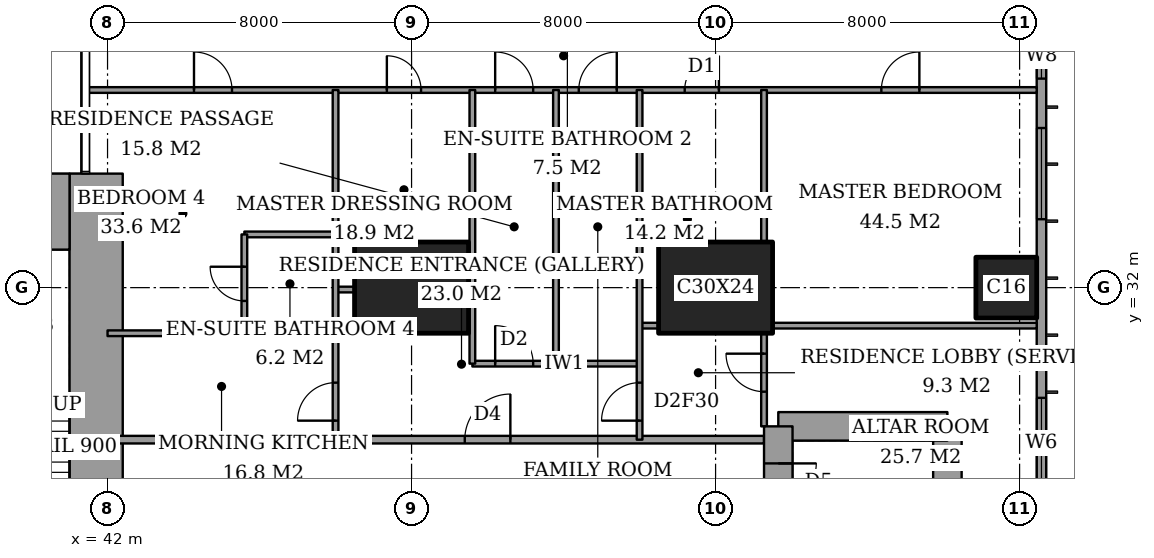
"""IFC4 building model, lengths in metres.
Left out: names, types, materials, properties, quantities, classifications, styles, units other than length and angle.
Written with IfcOpenShell. Run it as: python <this file> out.ifc"""

import sys

from ifc_helpers import new_model, si_unit, direction, frame, frame_2d, origin, origin_2d, place, context, subcontext, project, spatial, rectangle, extrude, element, fill, save


model = new_model("IFC4")
c1 = context("Model", 3, precision=1e-05, world=origin(), true_north=direction((0.0, 1.0)))
c2 = subcontext(c1, "Body", "Model", "MODEL_VIEW")
j1 = project(units=[si_unit("LENGTHUNIT", "METRE"), si_unit("PLANEANGLEUNIT", "RADIAN")], contexts=[c1])
p1 = place(None, origin())
s1 = spatial("IfcSite", under=j1, at=p1, CompositionType="ELEMENT")
p2 = place(p1, origin())
s2 = spatial("IfcBuilding", under=s1, at=p2, CompositionType="ELEMENT")
p3 = place(p2, frame((0.0, 0.0, 266.4)))
s3 = spatial("IfcBuildingStorey", under=s2, at=p3, CompositionType="ELEMENT", Elevation=266.4)
for number, where, z_axis, x_axis in (
    (1, (50.0, 32.0, 0.0), (0.0, 0.0, 1.0), (1.0, 0.0, 0.0)),
    (2, (58.0, 32.0, 0.0), (0.0, 0.0, 1.0), (1.0, 0.0, 0.0)),
):
    element("IfcColumn", number, at=place(p3, frame(where, z_axis=z_axis, x_axis=x_axis)), inside=s3, PredefinedType="COLUMN", context=c2, shape_type="SweptSolid", body=[
        extrude(rectangle(XDim=3.0, YDim=2.4, at=origin_2d()), origin(), (0.0, 0.0, 1.0), 3.6),
    ])
p4 = place(p3, frame((65.65, 32.0, 0.0), z_axis=(0.0, 0.0, 1.0), x_axis=(1.0, 0.0, 0.0)))
e3 = element("IfcColumn", 3, at=p4, inside=s3, PredefinedType="COLUMN", context=c2, shape_type="SweptSolid", body=[
    extrude(rectangle(XDim=1.6, YDim=1.6, at=origin_2d()), origin(), (0.0, 0.0, 1.0), 3.6),
])
p5 = place(p3, frame((37.85, 34.0, 0.0), z_axis=(0.0, 0.0, 1.0), x_axis=(1.0, 0.0, 0.0)))
e4 = element("IfcWall", 4, at=p5, inside=s3, PredefinedType="SHEAR", context=c2, shape_type="SweptSolid", body=[
    extrude(rectangle(XDim=3.15, YDim=2.0, at=frame_2d((1.575, 0.0))), origin(), (0.0, 0.0, 1.0), 3.6),
])
p6 = place(p3, frame((41.7, 24.85, 0.0), z_axis=(0.0, 0.0, 1.0), x_axis=(0.0, 1.0, 0.0)))
e5 = element("IfcWall", 5, at=p6, inside=s3, PredefinedType="SHEAR", context=c2, shape_type="SweptSolid", body=[
    extrude(rectangle(XDim=10.15, YDim=1.4, at=frame_2d((5.075, 0.0))), origin(), (0.0, 0.0, 1.0), 3.6),
])
p7 = place(p3, frame((64.1, 19.65, 0.0), z_axis=(0.0, 0.0, 1.0), x_axis=(0.0, 1.0, 0.0)))
e6 = element("IfcWall", 6, at=p7, inside=s3, PredefinedType="SHEAR", context=c2, shape_type="SweptSolid", body=[
    extrude(rectangle(XDim=8.7, YDim=0.75, at=frame_2d((4.35, 0.0))), origin(), (0.0, 0.0, 1.0), 3.6),
])
p8 = place(p3, frame((64.1, 28.35, 0.0), z_axis=(0.0, 0.0, 1.0), x_axis=(-1.0, 0.0, 0.0)))
e7 = element("IfcWall", 7, at=p8, inside=s3, PredefinedType="SHEAR", context=c2, shape_type="SweptSolid", body=[
    extrude(rectangle(XDim=4.45, YDim=0.75, at=frame_2d((2.225, 0.0))), origin(), (0.0, 0.0, 1.0), 3.6),
])
p9 = place(p3, frame((59.65, 28.35, 0.0), z_axis=(0.0, 0.0, 1.0), x_axis=(0.0, -1.0, 0.0)))
e8 = element("IfcWall", 8, at=p9, inside=s3, PredefinedType="SHEAR", context=c2, shape_type="SweptSolid", body=[
    extrude(rectangle(XDim=8.7, YDim=0.75, at=frame_2d((4.35, 0.0))), origin(), (0.0, 0.0, 1.0), 3.6),
])
p10 = place(p9, frame((0.975, 0.0, 0.0)))
e9 = element("IfcOpeningElement", 9, at=p10, cuts=e8, PredefinedType="OPENING", context=c2, shape_type="SweptSolid", body=[
    extrude(rectangle(XDim=1.0, YDim=2.1, at=frame_2d((0.5, 1.05))), frame((0.0, 0.385, 0.0), z_axis=(0.0, -1.0, 0.0), x_axis=(1.0, 0.0, 0.0)), (0.0, 0.0, 1.0), 0.77),
])
p11 = place(p3, frame((66.575, 3.175, 0.0), z_axis=(0.0, 0.0, 1.0), x_axis=(0.0, 1.0, 0.0)))
e10 = element("IfcWall", 10, at=p11, inside=s3, PredefinedType="SOLIDWALL", context=c2, shape_type="SweptSolid", body=[
    extrude(rectangle(XDim=41.65, YDim=0.25, at=frame_2d((20.825, 0.0))), origin(), (0.0, 0.0, 1.0), 3.6),
])
p12 = place(p11, frame((0.875, 0.0, 0.6)))
e11 = element("IfcOpeningElement", 11, at=p12, cuts=e10, PredefinedType="OPENING", context=c2, shape_type="SweptSolid", body=[
    extrude(rectangle(XDim=2.4, YDim=2.0, at=frame_2d((1.2, 1.0))), frame((0.0, 0.135, 0.0), z_axis=(0.0, -1.0, 0.0), x_axis=(1.0, 0.0, 0.0)), (0.0, 0.0, 1.0), 0.27),
])
p13 = place(p11, frame((6.0, 0.0, 0.6)))
e12 = element("IfcOpeningElement", 12, at=p13, cuts=e10, PredefinedType="OPENING", context=c2, shape_type="SweptSolid", body=[
    extrude(rectangle(XDim=1.2, YDim=2.0, at=frame_2d((0.6, 1.0))), frame((0.0, 0.135, 0.0), z_axis=(0.0, -1.0, 0.0), x_axis=(1.0, 0.0, 0.0)), (0.0, 0.0, 1.0), 0.27),
])
p14 = place(p11, frame((8.525, 0.0, 0.6)))
e13 = element("IfcOpeningElement", 13, at=p14, cuts=e10, PredefinedType="OPENING", context=c2, shape_type="SweptSolid", body=[
    extrude(rectangle(XDim=2.4, YDim=2.0, at=frame_2d((1.2, 1.0))), frame((0.0, 0.135, 0.0), z_axis=(0.0, -1.0, 0.0), x_axis=(1.0, 0.0, 0.0)), (0.0, 0.0, 1.0), 0.27),
])
p15 = place(p11, frame((15.625, 0.0, 0.6)))
e14 = element("IfcOpeningElement", 14, at=p15, cuts=e10, PredefinedType="OPENING", context=c2, shape_type="SweptSolid", body=[
    extrude(rectangle(XDim=2.4, YDim=2.0, at=frame_2d((1.2, 1.0))), frame((0.0, 0.135, 0.0), z_axis=(0.0, -1.0, 0.0), x_axis=(1.0, 0.0, 0.0)), (0.0, 0.0, 1.0), 0.27),
])
p16 = place(p11, frame((23.525, 0.0, 0.6)))
e15 = element("IfcOpeningElement", 15, at=p16, cuts=e10, PredefinedType="OPENING", context=c2, shape_type="SweptSolid", body=[
    extrude(rectangle(XDim=2.4, YDim=2.0, at=frame_2d((1.2, 1.0))), frame((0.0, 0.135, 0.0), z_axis=(0.0, -1.0, 0.0), x_axis=(1.0, 0.0, 0.0)), (0.0, 0.0, 1.0), 0.27),
])
p17 = place(p11, frame((30.625, 0.0, 0.6)))
e16 = element("IfcOpeningElement", 16, at=p17, cuts=e10, PredefinedType="OPENING", context=c2, shape_type="SweptSolid", body=[
    extrude(rectangle(XDim=2.4, YDim=2.0, at=frame_2d((1.2, 1.0))), frame((0.0, 0.135, 0.0), z_axis=(0.0, -1.0, 0.0), x_axis=(1.0, 0.0, 0.0)), (0.0, 0.0, 1.0), 0.27),
])
p18 = place(p11, frame((34.325, 0.0, 0.6)))
e17 = element("IfcOpeningElement", 17, at=p18, cuts=e10, PredefinedType="OPENING", context=c2, shape_type="SweptSolid", body=[
    extrude(rectangle(XDim=1.2, YDim=2.0, at=frame_2d((0.6, 1.0))), frame((0.0, 0.135, 0.0), z_axis=(0.0, -1.0, 0.0), x_axis=(1.0, 0.0, 0.0)), (0.0, 0.0, 1.0), 0.27),
])
p19 = place(p11, frame((38.375, 0.0, 0.6)))
e18 = element("IfcOpeningElement", 18, at=p19, cuts=e10, PredefinedType="OPENING", context=c2, shape_type="SweptSolid", body=[
    extrude(rectangle(XDim=2.4, YDim=2.0, at=frame_2d((1.2, 1.0))), frame((0.0, 0.135, 0.0), z_axis=(0.0, -1.0, 0.0), x_axis=(1.0, 0.0, 0.0)), (0.0, 0.0, 1.0), 0.27),
])
p20 = place(p3, frame((42.0, 28.0, 0.0), z_axis=(0.0, 0.0, 1.0), x_axis=(1.0, 0.0, 0.0)))
e19 = element("IfcWall", 19, at=p20, inside=s3, PredefinedType="PARTITIONING", context=c2, shape_type="SweptSolid", body=[
    extrude(rectangle(XDim=17.275, YDim=0.2, at=frame_2d((8.637, 0.0))), origin(), (0.0, 0.0, 1.0), 3.35),
])
p21 = place(p20, frame((9.4, 0.0, 0.0)))
e20 = element("IfcOpeningElement", 20, at=p21, cuts=e19, PredefinedType="OPENING", context=c2, shape_type="SweptSolid", body=[
    extrude(rectangle(XDim=1.2, YDim=2.4, at=frame_2d((0.6, 1.2))), frame((0.0, 0.11, 0.0), z_axis=(0.0, -1.0, 0.0), x_axis=(1.0, 0.0, 0.0)), (0.0, 0.0, 1.0), 0.22),
])
p22 = place(p3, frame((51.6, 30.0, 0.0), z_axis=(0.0, 0.0, 1.0), x_axis=(1.0, 0.0, 0.0)))
e21 = element("IfcWall", 21, at=p22, inside=s3, PredefinedType="PARTITIONING", context=c2, shape_type="SweptSolid", body=[
    extrude(rectangle(XDim=4.4, YDim=0.15, at=frame_2d((2.2, 0.0))), origin(), (0.0, 0.0, 1.0), 3.35),
])
p23 = place(p22, frame((0.6, 0.0, 0.0)))
e22 = element("IfcOpeningElement", 22, at=p23, cuts=e21, PredefinedType="OPENING", context=c2, shape_type="SweptSolid", body=[
    extrude(rectangle(XDim=1.0, YDim=2.1, at=frame_2d((0.5, 1.05))), frame((0.0, 0.085, 0.0), z_axis=(0.0, -1.0, 0.0), x_axis=(1.0, 0.0, 0.0)), (0.0, 0.0, 1.0), 0.17),
])
p24 = place(p3, frame((42.0, 30.8, 0.0), z_axis=(0.0, 0.0, 1.0), x_axis=(1.0, 0.0, 0.0)))
e23 = element("IfcWall", 23, at=p24, inside=s3, PredefinedType="PARTITIONING", context=c2, shape_type="SweptSolid", body=[
    extrude(rectangle(XDim=6.0, YDim=0.15, at=frame_2d((3.0, 0.0))), origin(), (0.0, 0.0, 1.0), 3.35),
])
p25 = place(p3, frame((56.0, 31.0, 0.0), z_axis=(0.0, 0.0, 1.0), x_axis=(1.0, 0.0, 0.0)))
e24 = element("IfcWall", 24, at=p25, inside=s3, PredefinedType="PARTITIONING", context=c2, shape_type="SweptSolid", body=[
    extrude(rectangle(XDim=0.5, YDim=0.15, at=frame_2d((0.25, 0.0))), origin(), (0.0, 0.0, 1.0), 3.35),
])
p26 = place(p3, frame((59.5, 31.0, 0.0), z_axis=(0.0, 0.0, 1.0), x_axis=(1.0, 0.0, 0.0)))
e25 = element("IfcWall", 25, at=p26, inside=s3, PredefinedType="PARTITIONING", context=c2, shape_type="SweptSolid", body=[
    extrude(rectangle(XDim=6.95, YDim=0.15, at=frame_2d((3.475, 0.0))), origin(), (0.0, 0.0, 1.0), 3.35),
])
p27 = place(p3, frame((48.0, 31.95, 0.0), z_axis=(0.0, 0.0, 1.0), x_axis=(1.0, 0.0, 0.0)))
e26 = element("IfcWall", 26, at=p27, inside=s3, PredefinedType="PARTITIONING", context=c2, shape_type="SweptSolid", body=[
    extrude(rectangle(XDim=0.5, YDim=0.15, at=frame_2d((0.25, 0.0))), origin(), (0.0, 0.0, 1.0), 2.634),
])
p28 = place(p3, frame((45.6, 33.4, 0.0), z_axis=(0.0, 0.0, 1.0), x_axis=(1.0, 0.0, 0.0)))
e27 = element("IfcWall", 27, at=p28, inside=s3, PredefinedType="PARTITIONING", context=c2, shape_type="SweptSolid", body=[
    extrude(rectangle(XDim=2.4, YDim=0.15, at=frame_2d((1.2, 0.0))), origin(), (0.0, 0.0, 1.0), 3.35),
])
p29 = place(p3, frame((41.439, 37.2, 0.0), z_axis=(0.0, 0.0, 1.0), x_axis=(1.0, 0.0, 0.0)))
e28 = element("IfcWall", 28, at=p29, inside=s3, PredefinedType="PARTITIONING", context=c2, shape_type="SweptSolid", body=[
    extrude(rectangle(XDim=25.011, YDim=0.15, at=frame_2d((12.505, 0.0))), origin(), (0.0, 0.0, 1.0), 3.35),
])
p30 = place(p29, frame((10.761, 0.0, 0.0)))
e29 = element("IfcOpeningElement", 29, at=p30, cuts=e28, PredefinedType="OPENING", context=c2, shape_type="SweptSolid", body=[
    extrude(rectangle(XDim=1.0, YDim=2.1, at=frame_2d((0.5, 1.05))), frame((0.0, 0.085, 0.0), z_axis=(0.0, -1.0, 0.0), x_axis=(1.0, 0.0, 0.0)), (0.0, 0.0, 1.0), 0.17),
])
p31 = place(p29, frame((20.924, 0.0, 0.0)))
e30 = element("IfcOpeningElement", 30, at=p31, cuts=e28, PredefinedType="OPENING", context=c2, shape_type="SweptSolid", body=[
    extrude(rectangle(XDim=1.0, YDim=2.1, at=frame_2d((0.5, 1.05))), frame((0.0, 0.085, 0.0), z_axis=(0.0, -1.0, 0.0), x_axis=(1.0, 0.0, 0.0)), (0.0, 0.0, 1.0), 0.17),
])
p32 = place(p29, frame((15.749, 0.0, 0.0)))
e31 = element("IfcOpeningElement", 31, at=p32, cuts=e28, PredefinedType="OPENING", context=c2, shape_type="SweptSolid", body=[
    extrude(rectangle(XDim=0.9, YDim=2.1, at=frame_2d((0.45, 1.05))), frame((0.0, 0.085, 0.0), z_axis=(0.0, -1.0, 0.0), x_axis=(1.0, 0.0, 0.0)), (0.0, 0.0, 1.0), 0.17),
])
p33 = place(p29, frame((12.961, 0.0, 0.0)))
e32 = element("IfcOpeningElement", 32, at=p33, cuts=e28, PredefinedType="OPENING", context=c2, shape_type="SweptSolid", body=[
    extrude(rectangle(XDim=1.0, YDim=2.1, at=frame_2d((0.5, 1.05))), frame((0.0, 0.085, 0.0), z_axis=(0.0, -1.0, 0.0), x_axis=(1.0, 0.0, 0.0)), (0.0, 0.0, 1.0), 0.17),
])
p34 = place(p29, frame((7.911, 0.0, 0.0)))
e33 = element("IfcOpeningElement", 33, at=p34, cuts=e28, PredefinedType="OPENING", context=c2, shape_type="SweptSolid", body=[
    extrude(rectangle(XDim=0.9, YDim=2.1, at=frame_2d((0.45, 1.05))), frame((0.0, 0.085, 0.0), z_axis=(0.0, -1.0, 0.0), x_axis=(1.0, 0.0, 0.0)), (0.0, 0.0, 1.0), 0.17),
])
p35 = place(p29, frame((2.836, 0.0, 0.0)))
e34 = element("IfcOpeningElement", 34, at=p35, cuts=e28, PredefinedType="OPENING", context=c2, shape_type="SweptSolid", body=[
    extrude(rectangle(XDim=1.0, YDim=2.1, at=frame_2d((0.5, 1.05))), frame((0.0, 0.085, 0.0), z_axis=(0.0, -1.0, 0.0), x_axis=(1.0, 0.0, 0.0)), (0.0, 0.0, 1.0), 0.17),
])
p36 = place(p3, frame((45.6, 30.8, 0.0), z_axis=(0.0, 0.0, 1.0), x_axis=(0.0, 1.0, 0.0)))
e35 = element("IfcWall", 35, at=p36, inside=s3, PredefinedType="PARTITIONING", context=c2, shape_type="SweptSolid", body=[
    extrude(rectangle(XDim=2.6, YDim=0.15, at=frame_2d((1.3, 0.0))), origin(), (0.0, 0.0, 1.0), 3.35),
])
p37 = place(p36, frame((0.85, 0.0, 0.0)))
e36 = element("IfcOpeningElement", 36, at=p37, cuts=e35, PredefinedType="OPENING", context=c2, shape_type="SweptSolid", body=[
    extrude(rectangle(XDim=0.9, YDim=2.1, at=frame_2d((0.45, 1.05))), frame((0.0, 0.085, 0.0), z_axis=(0.0, -1.0, 0.0), x_axis=(1.0, 0.0, 0.0)), (0.0, 0.0, 1.0), 0.17),
])
p38 = place(p3, frame((48.0, 28.0, 0.0), z_axis=(0.0, 0.0, 1.0), x_axis=(0.0, 1.0, 0.0)))
e37 = element("IfcWall", 37, at=p38, inside=s3, PredefinedType="PARTITIONING", context=c2, shape_type="SweptSolid", body=[
    extrude(rectangle(XDim=9.2, YDim=0.15, at=frame_2d((4.6, 0.0))), origin(), (0.0, 0.0, 1.0), 3.35),
])
p39 = place(p38, frame((0.5, 0.0, 0.0)))
e38 = element("IfcOpeningElement", 38, at=p39, cuts=e37, PredefinedType="OPENING", context=c2, shape_type="SweptSolid", body=[
    extrude(rectangle(XDim=1.0, YDim=2.1, at=frame_2d((0.5, 1.05))), frame((0.0, 0.085, 0.0), z_axis=(0.0, -1.0, 0.0), x_axis=(1.0, 0.0, 0.0)), (0.0, 0.0, 1.0), 0.17),
])
for number, where, z_axis, x_axis in (
    (39, (51.6, 30.0, 0.0), (0.0, 0.0, 1.0), (0.0, 1.0, 0.0)),
    (40, (53.8, 30.0, 0.0), (0.0, 0.0, 1.0), (0.0, 1.0, 0.0)),
):
    element("IfcWall", number, at=place(p3, frame(where, z_axis=z_axis, x_axis=x_axis)), inside=s3, PredefinedType="PARTITIONING", context=c2, shape_type="SweptSolid", body=[
        extrude(rectangle(XDim=7.2, YDim=0.15, at=frame_2d((3.6, 0.0))), origin(), (0.0, 0.0, 1.0), 3.35),
    ])
p40 = place(p3, frame((56.0, 28.0, 0.0), z_axis=(0.0, 0.0, 1.0), x_axis=(0.0, 1.0, 0.0)))
e41 = element("IfcWall", 41, at=p40, inside=s3, PredefinedType="PARTITIONING", context=c2, shape_type="SweptSolid", body=[
    extrude(rectangle(XDim=9.2, YDim=0.15, at=frame_2d((4.6, 0.0))), origin(), (0.0, 0.0, 1.0), 3.35),
])
p41 = place(p40, frame((0.5, 0.0, 0.0)))
e42 = element("IfcOpeningElement", 42, at=p41, cuts=e41, PredefinedType="OPENING", context=c2, shape_type="SweptSolid", body=[
    extrude(rectangle(XDim=1.0, YDim=2.1, at=frame_2d((0.5, 1.05))), frame((0.0, 0.085, 0.0), z_axis=(0.0, -1.0, 0.0), x_axis=(1.0, 0.0, 0.0)), (0.0, 0.0, 1.0), 0.17),
])
p42 = place(p3, frame((59.275, 28.35, 0.0), z_axis=(0.0, 0.0, 1.0), x_axis=(0.0, 1.0, 0.0)))
e43 = element("IfcWall", 43, at=p42, inside=s3, PredefinedType="PARTITIONING", context=c2, shape_type="SweptSolid", body=[
    extrude(rectangle(XDim=2.45, YDim=0.15, at=frame_2d((1.225, 0.0))), origin(), (0.0, 0.0, 1.0), 3.35),
])
p43 = place(p42, frame((0.913, 0.0, 0.0)))
e44 = element("IfcOpeningElement", 44, at=p43, cuts=e43, PredefinedType="OPENING", context=c2, shape_type="SweptSolid", body=[
    extrude(rectangle(XDim=1.0, YDim=2.1, at=frame_2d((0.5, 1.05))), frame((0.0, 0.085, 0.0), z_axis=(0.0, -1.0, 0.0), x_axis=(1.0, 0.0, 0.0)), (0.0, 0.0, 1.0), 0.17),
])
p44 = place(p3, frame((59.275, 33.2, 0.0), z_axis=(0.0, 0.0, 1.0), x_axis=(0.0, 1.0, 0.0)))
e45 = element("IfcWall", 45, at=p44, inside=s3, PredefinedType="PARTITIONING", context=c2, shape_type="SweptSolid", body=[
    extrude(rectangle(XDim=4.0, YDim=0.15, at=frame_2d((2.0, 0.0))), origin(), (0.0, 0.0, 1.0), 3.35),
])
p45 = place(p16, origin())
e46 = element("IfcWindow", 46, at=p45, inside=s3, PartitioningType="SINGLE_PANEL", PredefinedType="WINDOW", context=c2, shape_type="SweptSolid", body=[
    extrude(rectangle(XDim=2.4, YDim=2.0, at=frame_2d((1.2, 1.0))), frame((0.0, 0.03, 0.0), z_axis=(0.0, -1.0, 0.0), x_axis=(1.0, 0.0, 0.0)), (0.0, 0.0, 1.0), 0.06),
])
fill(e15, e46)
p46 = place(p17, origin())
e47 = element("IfcWindow", 47, at=p46, inside=s3, PartitioningType="SINGLE_PANEL", PredefinedType="WINDOW", context=c2, shape_type="SweptSolid", body=[
    extrude(rectangle(XDim=2.4, YDim=2.0, at=frame_2d((1.2, 1.0))), frame((0.0, 0.03, 0.0), z_axis=(0.0, -1.0, 0.0), x_axis=(1.0, 0.0, 0.0)), (0.0, 0.0, 1.0), 0.06),
])
fill(e16, e47)
p47 = place(p18, origin())
e48 = element("IfcWindow", 48, at=p47, inside=s3, PartitioningType="SINGLE_PANEL", PredefinedType="WINDOW", context=c2, shape_type="SweptSolid", body=[
    extrude(rectangle(XDim=1.2, YDim=2.0, at=frame_2d((0.6, 1.0))), frame((0.0, 0.03, 0.0), z_axis=(0.0, -1.0, 0.0), x_axis=(1.0, 0.0, 0.0)), (0.0, 0.0, 1.0), 0.06),
])
fill(e17, e48)
p48 = place(p30, origin())
e49 = element("IfcDoor", 49, at=p48, inside=s3, OperationType="SINGLE_SWING_RIGHT", PredefinedType="DOOR", context=c2, shape_type="SweptSolid", body=[
    extrude(rectangle(XDim=1.0, YDim=2.1, at=frame_2d((0.5, 1.05))), frame((0.0, 0.025, 0.0), z_axis=(0.0, -1.0, 0.0), x_axis=(1.0, 0.0, 0.0)), (0.0, 0.0, 1.0), 0.05),
])
fill(e29, e49)
p49 = place(p31, origin())
e50 = element("IfcDoor", 50, at=p49, inside=s3, OperationType="SINGLE_SWING_LEFT", PredefinedType="DOOR", context=c2, shape_type="SweptSolid", body=[
    extrude(rectangle(XDim=1.0, YDim=2.1, at=frame_2d((0.5, 1.05))), frame((0.0, 0.025, 0.0), z_axis=(0.0, -1.0, 0.0), x_axis=(1.0, 0.0, 0.0)), (0.0, 0.0, 1.0), 0.05),
])
fill(e30, e50)
p50 = place(p43, origin())
e51 = element("IfcDoor", 51, at=p50, inside=s3, OperationType="SINGLE_SWING_LEFT", PredefinedType="DOOR", context=c2, shape_type="SweptSolid", body=[
    extrude(rectangle(XDim=1.0, YDim=2.1, at=frame_2d((0.5, 1.05))), frame((0.0, 0.025, 0.0), z_axis=(0.0, -1.0, 0.0), x_axis=(1.0, 0.0, 0.0)), (0.0, 0.0, 1.0), 0.05),
])
fill(e44, e51)
p51 = place(p32, origin())
e52 = element("IfcDoor", 52, at=p51, inside=s3, OperationType="SINGLE_SWING_LEFT", PredefinedType="DOOR", context=c2, shape_type="SweptSolid", body=[
    extrude(rectangle(XDim=0.9, YDim=2.1, at=frame_2d((0.45, 1.05))), frame((0.0, 0.025, 0.0), z_axis=(0.0, -1.0, 0.0), x_axis=(1.0, 0.0, 0.0)), (0.0, 0.0, 1.0), 0.05),
])
fill(e31, e52)
p52 = place(p41, origin())
e53 = element("IfcDoor", 53, at=p52, inside=s3, OperationType="SINGLE_SWING_RIGHT", PredefinedType="DOOR", context=c2, shape_type="SweptSolid", body=[
    extrude(rectangle(XDim=1.0, YDim=2.1, at=frame_2d((0.5, 1.05))), frame((0.0, 0.025, 0.0), z_axis=(0.0, -1.0, 0.0), x_axis=(1.0, 0.0, 0.0)), (0.0, 0.0, 1.0), 0.05),
])
fill(e42, e53)
p53 = place(p21, origin())
e54 = element("IfcDoor", 54, at=p53, inside=s3, OperationType="SINGLE_SWING_LEFT", PredefinedType="DOOR", context=c2, shape_type="SweptSolid", body=[
    extrude(rectangle(XDim=1.2, YDim=2.4, at=frame_2d((0.6, 1.2))), frame((0.0, 0.025, 0.0), z_axis=(0.0, -1.0, 0.0), x_axis=(1.0, 0.0, 0.0)), (0.0, 0.0, 1.0), 0.05),
])
fill(e20, e54)
p54 = place(p33, origin())
e55 = element("IfcDoor", 55, at=p54, inside=s3, OperationType="SINGLE_SWING_LEFT", PredefinedType="DOOR", context=c2, shape_type="SweptSolid", body=[
    extrude(rectangle(XDim=1.0, YDim=2.1, at=frame_2d((0.5, 1.05))), frame((0.0, 0.025, 0.0), z_axis=(0.0, -1.0, 0.0), x_axis=(1.0, 0.0, 0.0)), (0.0, 0.0, 1.0), 0.05),
])
fill(e32, e55)
p55 = place(p23, origin())
e56 = element("IfcDoor", 56, at=p55, inside=s3, OperationType="SINGLE_SWING_RIGHT", PredefinedType="DOOR", context=c2, shape_type="SweptSolid", body=[
    extrude(rectangle(XDim=1.0, YDim=2.1, at=frame_2d((0.5, 1.05))), frame((0.0, 0.025, 0.0), z_axis=(0.0, -1.0, 0.0), x_axis=(1.0, 0.0, 0.0)), (0.0, 0.0, 1.0), 0.05),
])
fill(e22, e56)
p56 = place(p34, origin())
e57 = element("IfcDoor", 57, at=p56, inside=s3, OperationType="SINGLE_SWING_RIGHT", PredefinedType="DOOR", context=c2, shape_type="SweptSolid", body=[
    extrude(rectangle(XDim=0.9, YDim=2.1, at=frame_2d((0.45, 1.05))), frame((0.0, 0.025, 0.0), z_axis=(0.0, -1.0, 0.0), x_axis=(1.0, 0.0, 0.0)), (0.0, 0.0, 1.0), 0.05),
])
fill(e33, e57)
p57 = place(p37, origin())
e58 = element("IfcDoor", 58, at=p57, inside=s3, OperationType="SINGLE_SWING_LEFT", PredefinedType="DOOR", context=c2, shape_type="SweptSolid", body=[
    extrude(rectangle(XDim=0.9, YDim=2.1, at=frame_2d((0.45, 1.05))), frame((0.0, 0.025, 0.0), z_axis=(0.0, -1.0, 0.0), x_axis=(1.0, 0.0, 0.0)), (0.0, 0.0, 1.0), 0.05),
])
fill(e36, e58)
p58 = place(p35, origin())
e59 = element("IfcDoor", 59, at=p58, inside=s3, OperationType="SINGLE_SWING_RIGHT", PredefinedType="DOOR", context=c2, shape_type="SweptSolid", body=[
    extrude(rectangle(XDim=1.0, YDim=2.1, at=frame_2d((0.5, 1.05))), frame((0.0, 0.025, 0.0), z_axis=(0.0, -1.0, 0.0), x_axis=(1.0, 0.0, 0.0)), (0.0, 0.0, 1.0), 0.05),
])
fill(e34, e59)
p59 = place(p39, origin())
e60 = element("IfcDoor", 60, at=p59, inside=s3, OperationType="SINGLE_SWING_RIGHT", PredefinedType="DOOR", context=c2, shape_type="SweptSolid", body=[
    extrude(rectangle(XDim=1.0, YDim=2.1, at=frame_2d((0.5, 1.05))), frame((0.0, 0.025, 0.0), z_axis=(0.0, -1.0, 0.0), x_axis=(1.0, 0.0, 0.0)), (0.0, 0.0, 1.0), 0.05),
])
fill(e38, e60)
p60 = place(p10, origin())
e61 = element("IfcDoor", 61, at=p60, inside=s3, OperationType="SINGLE_SWING_RIGHT", PredefinedType="DOOR", context=c2, shape_type="SweptSolid", body=[
    extrude(rectangle(XDim=1.0, YDim=2.1, at=frame_2d((0.5, 1.05))), frame((0.0, 0.025, 0.0), z_axis=(0.0, -1.0, 0.0), x_axis=(1.0, 0.0, 0.0)), (0.0, 0.0, 1.0), 0.05),
])
fill(e9, e61)
save(model, sys.argv[1])
